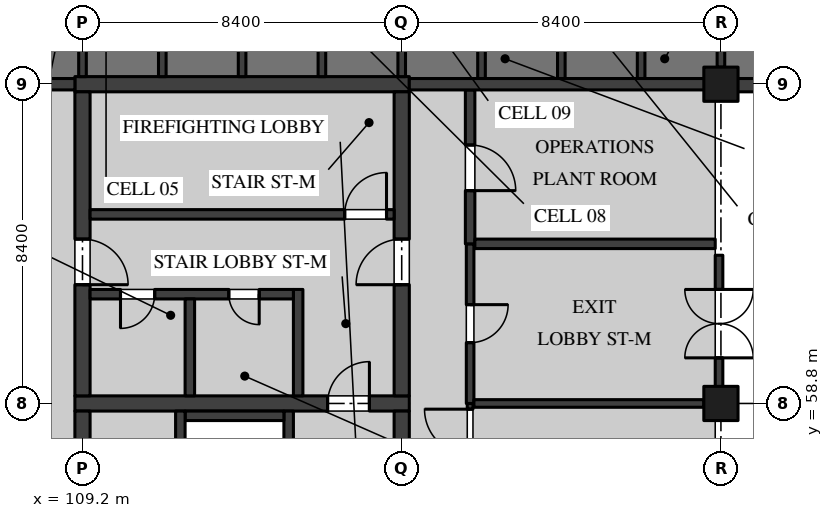
"""IFC4 building model, lengths in metres.
Left out: names, types, materials, properties, quantities, classifications, styles, units other than length and angle.
Written with IfcOpenShell. Run it as: python <this file> out.ifc"""

import sys

from ifc_helpers import new_model, si_unit, direction, frame, frame_2d, origin, origin_2d, place, context, subcontext, project, spatial, rectangle, extrude, element, fill, save


model = new_model("IFC4")
c1 = context("Model", 3, precision=1e-05, world=origin(), true_north=direction((0.0, 1.0)))
c2 = subcontext(c1, "Body", "Model", "MODEL_VIEW")
j1 = project(units=[si_unit("LENGTHUNIT", "METRE"), si_unit("PLANEANGLEUNIT", "RADIAN")], contexts=[c1])
p1 = place(None, origin())
s1 = spatial("IfcSite", under=j1, at=p1, CompositionType="ELEMENT")
p2 = place(p1, origin())
s2 = spatial("IfcBuilding", under=s1, at=p2, CompositionType="ELEMENT")
p3 = place(p2, origin())
s3 = spatial("IfcBuildingStorey", under=s2, at=p3, CompositionType="ELEMENT", Elevation=0.0)
for number, where, z_axis, x_axis in (
    (1, (126.0, 58.8, 0.0), (0.0, 0.0, 1.0), (1.0, 0.0, 0.0)),
    (2, (126.0, 67.2, 0.0), (0.0, 0.0, 1.0), (1.0, 0.0, 0.0)),
):
    element("IfcColumn", number, at=place(p3, frame(where, z_axis=z_axis, x_axis=x_axis)), inside=s3, PredefinedType="COLUMN", context=c2, shape_type="SweptSolid", body=[
        extrude(rectangle(XDim=0.9, YDim=0.9, at=origin_2d()), origin(), (0.0, 0.0, 1.0), 5.05),
    ])
p4 = place(p3, frame((109.0, 58.8, 0.0), z_axis=(0.0, 0.0, 1.0), x_axis=(1.0, 0.0, 0.0)))
e3 = element("IfcWall", 3, at=p4, inside=s3, PredefinedType="SHEAR", context=c2, shape_type="SweptSolid", body=[
    extrude(rectangle(XDim=8.8, YDim=0.4, at=frame_2d((4.4, 0.0))), origin(), (0.0, 0.0, 1.0), 5.05),
])
p5 = place(p4, frame((6.65, 0.0, 0.0)))
e4 = element("IfcOpeningElement", 4, at=p5, cuts=e3, PredefinedType="OPENING", context=c2, shape_type="SweptSolid", body=[
    extrude(rectangle(XDim=1.1, YDim=2.1, at=frame_2d((0.55, 1.05))), frame((0.0, 0.21, 0.0), z_axis=(0.0, -1.0, 0.0), x_axis=(1.0, 0.0, 0.0)), (0.0, 0.0, 1.0), 0.42),
])
p6 = place(p3, frame((109.2, 50.6, 0.0), z_axis=(0.0, 0.0, 1.0), x_axis=(0.0, 1.0, 0.0)))
e5 = element("IfcWall", 5, at=p6, inside=s3, PredefinedType="SHEAR", context=c2, shape_type="SweptSolid", body=[
    extrude(rectangle(XDim=8.0, YDim=0.4, at=frame_2d((4.0, 0.0))), origin(), (0.0, 0.0, 1.0), 5.05),
])
p7 = place(p6, frame((3.25, 0.0, 0.0)))
e6 = element("IfcOpeningElement", 6, at=p7, cuts=e5, PredefinedType="OPENING", context=c2, shape_type="SweptSolid", body=[
    extrude(rectangle(XDim=1.2, YDim=2.1, at=frame_2d((0.6, 1.05))), frame((0.0, 0.21, 0.0), z_axis=(0.0, -1.0, 0.0), x_axis=(1.0, 0.0, 0.0)), (0.0, 0.0, 1.0), 0.42),
])
p8 = place(p3, frame((117.6, 50.6, 0.0), z_axis=(0.0, 0.0, 1.0), x_axis=(0.0, 1.0, 0.0)))
e7 = element("IfcWall", 7, at=p8, inside=s3, PredefinedType="SHEAR", context=c2, shape_type="SweptSolid", body=[
    extrude(rectangle(XDim=8.0, YDim=0.4, at=frame_2d((4.0, 0.0))), origin(), (0.0, 0.0, 1.0), 5.05),
])
p9 = place(p8, frame((3.25, 0.0, 0.0)))
e8 = element("IfcOpeningElement", 8, at=p9, cuts=e7, PredefinedType="OPENING", context=c2, shape_type="SweptSolid", body=[
    extrude(rectangle(XDim=1.2, YDim=2.1, at=frame_2d((0.6, 1.05))), frame((0.0, 0.21, 0.0), z_axis=(0.0, -1.0, 0.0), x_axis=(1.0, 0.0, 0.0)), (0.0, 0.0, 1.0), 0.42),
])
p10 = place(p8, frame((6.0, 0.0, 0.0)))
e9 = element("IfcOpeningElement", 9, at=p10, cuts=e7, PredefinedType="OPENING", context=c2, shape_type="SweptSolid", body=[
    extrude(rectangle(XDim=1.2, YDim=2.1, at=frame_2d((0.6, 1.05))), frame((0.0, 0.21, 0.0), z_axis=(0.0, -1.0, 0.0), x_axis=(1.0, 0.0, 0.0)), (0.0, 0.0, 1.0), 0.42),
])
p11 = place(p3, frame((109.0, 67.2, 0.0), z_axis=(0.0, 0.0, 1.0), x_axis=(1.0, 0.0, 0.0)))
e10 = element("IfcWall", 10, at=p11, inside=s3, PredefinedType="SHEAR", context=c2, shape_type="SweptSolid", body=[
    extrude(rectangle(XDim=8.8, YDim=0.4, at=frame_2d((4.4, 0.0))), origin(), (0.0, 0.0, 1.0), 5.05),
])
p12 = place(p3, frame((109.2, 59.0, 0.0), z_axis=(0.0, 0.0, 1.0), x_axis=(0.0, 1.0, 0.0)))
e11 = element("IfcWall", 11, at=p12, inside=s3, PredefinedType="SHEAR", context=c2, shape_type="SweptSolid", body=[
    extrude(rectangle(XDim=8.0, YDim=0.4, at=frame_2d((4.0, 0.0))), origin(), (0.0, 0.0, 1.0), 5.05),
])
p13 = place(p12, frame((2.925, 0.0, 0.0)))
e12 = element("IfcOpeningElement", 12, at=p13, cuts=e11, PredefinedType="OPENING", context=c2, shape_type="SweptSolid", body=[
    extrude(rectangle(XDim=1.2, YDim=2.1, at=frame_2d((0.6, 1.05))), frame((0.0, 0.21, 0.0), z_axis=(0.0, -1.0, 0.0), x_axis=(1.0, 0.0, 0.0)), (0.0, 0.0, 1.0), 0.42),
])
p14 = place(p3, frame((117.6, 59.0, 0.0), z_axis=(0.0, 0.0, 1.0), x_axis=(0.0, 1.0, 0.0)))
e13 = element("IfcWall", 13, at=p14, inside=s3, PredefinedType="SHEAR", context=c2, shape_type="SweptSolid", body=[
    extrude(rectangle(XDim=8.0, YDim=0.4, at=frame_2d((4.0, 0.0))), origin(), (0.0, 0.0, 1.0), 5.05),
])
p15 = place(p14, frame((2.925, 0.0, 0.0)))
e14 = element("IfcOpeningElement", 14, at=p15, cuts=e13, PredefinedType="OPENING", context=c2, shape_type="SweptSolid", body=[
    extrude(rectangle(XDim=1.2, YDim=2.1, at=frame_2d((0.6, 1.05))), frame((0.0, 0.21, 0.0), z_axis=(0.0, -1.0, 0.0), x_axis=(1.0, 0.0, 0.0)), (0.0, 0.0, 1.0), 0.42),
])
p16 = place(p3, frame((117.4, 63.775, 0.0), z_axis=(0.0, 0.0, 1.0), x_axis=(-1.0, 0.0, 0.0)))
e15 = element("IfcWall", 15, at=p16, inside=s3, PredefinedType="SOLIDWALL", context=c2, shape_type="SweptSolid", body=[
    extrude(rectangle(XDim=8.0, YDim=0.25, at=frame_2d((4.0, 0.0))), origin(), (0.0, 0.0, 1.0), 5.05),
])
p17 = place(p16, frame((0.2, 0.0, 0.0)))
e16 = element("IfcOpeningElement", 16, at=p17, cuts=e15, PredefinedType="OPENING", context=c2, shape_type="SweptSolid", body=[
    extrude(rectangle(XDim=1.1, YDim=2.1, at=frame_2d((0.55, 1.05))), frame((0.0, 0.135, 0.0), z_axis=(0.0, -1.0, 0.0), x_axis=(1.0, 0.0, 0.0)), (0.0, 0.0, 1.0), 0.27),
])
p18 = place(p3, frame((114.875, 61.8, 0.0), z_axis=(0.0, 0.0, 1.0), x_axis=(0.0, -1.0, 0.0)))
e17 = element("IfcWall", 17, at=p18, inside=s3, PredefinedType="SOLIDWALL", context=c2, shape_type="SweptSolid", body=[
    extrude(rectangle(XDim=2.8, YDim=0.25, at=frame_2d((1.4, 0.0))), origin(), (0.0, 0.0, 1.0), 5.05),
])
p19 = place(p3, frame((114.75, 61.675, 0.0), z_axis=(0.0, 0.0, 1.0), x_axis=(-1.0, 0.0, 0.0)))
e18 = element("IfcWall", 18, at=p19, inside=s3, PredefinedType="SOLIDWALL", context=c2, shape_type="SweptSolid", body=[
    extrude(rectangle(XDim=5.35, YDim=0.25, at=frame_2d((2.675, 0.0))), origin(), (0.0, 0.0, 1.0), 5.05),
])
p20 = place(p19, frame((3.65, 0.0, 0.0)))
e19 = element("IfcOpeningElement", 19, at=p20, cuts=e18, PredefinedType="OPENING", context=c2, shape_type="SweptSolid", body=[
    extrude(rectangle(XDim=0.9, YDim=2.1, at=frame_2d((0.45, 1.05))), frame((0.0, 0.135, 0.0), z_axis=(0.0, -1.0, 0.0), x_axis=(1.0, 0.0, 0.0)), (0.0, 0.0, 1.0), 0.27),
])
p21 = place(p19, frame((0.9, 0.0, 0.0)))
e20 = element("IfcOpeningElement", 20, at=p21, cuts=e18, PredefinedType="OPENING", context=c2, shape_type="SweptSolid", body=[
    extrude(rectangle(XDim=0.8, YDim=2.1, at=frame_2d((0.4, 1.05))), frame((0.0, 0.135, 0.0), z_axis=(0.0, -1.0, 0.0), x_axis=(1.0, 0.0, 0.0)), (0.0, 0.0, 1.0), 0.27),
])
p22 = place(p3, frame((112.025, 61.55, 0.0), z_axis=(0.0, 0.0, 1.0), x_axis=(0.0, -1.0, 0.0)))
e21 = element("IfcWall", 21, at=p22, inside=s3, PredefinedType="SOLIDWALL", context=c2, shape_type="SweptSolid", body=[
    extrude(rectangle(XDim=2.55, YDim=0.25, at=frame_2d((1.275, 0.0))), origin(), (0.0, 0.0, 1.0), 5.05),
])
p23 = place(p3, frame((114.625, 55.5, 0.0), z_axis=(0.0, 0.0, 1.0), x_axis=(0.0, 1.0, 0.0)))
e22 = element("IfcWall", 22, at=p23, inside=s3, PredefinedType="SOLIDWALL", context=c2, shape_type="SweptSolid", body=[
    extrude(rectangle(XDim=3.1, YDim=0.25, at=frame_2d((1.55, 0.0))), origin(), (0.0, 0.0, 1.0), 5.05),
])
p24 = place(p23, frame((1.0, 0.0, 0.0)))
e23 = element("IfcOpeningElement", 23, at=p24, cuts=e22, PredefinedType="OPENING", context=c2, shape_type="SweptSolid", body=[
    extrude(rectangle(XDim=1.1, YDim=2.1, at=frame_2d((0.55, 1.05))), frame((0.0, 0.135, 0.0), z_axis=(0.0, -1.0, 0.0), x_axis=(1.0, 0.0, 0.0)), (0.0, 0.0, 1.0), 0.27),
])
p25 = place(p3, frame((111.9, 58.475, 0.0), z_axis=(0.0, 0.0, 1.0), x_axis=(1.0, 0.0, 0.0)))
e24 = element("IfcWall", 24, at=p25, inside=s3, PredefinedType="SOLIDWALL", context=c2, shape_type="SweptSolid", body=[
    extrude(rectangle(XDim=2.6, YDim=0.25, at=frame_2d((1.3, 0.0))), origin(), (0.0, 0.0, 1.0), 5.05),
])
p26 = place(p3, frame((111.775, 55.5, 0.0), z_axis=(0.0, 0.0, 1.0), x_axis=(0.0, 1.0, 0.0)))
e25 = element("IfcWall", 25, at=p26, inside=s3, PredefinedType="SOLIDWALL", context=c2, shape_type="SweptSolid", body=[
    extrude(rectangle(XDim=3.1, YDim=0.25, at=frame_2d((1.55, 0.0))), origin(), (0.0, 0.0, 1.0), 5.05),
])
p27 = place(p3, frame((119.4, 46.2, 0.0), z_axis=(0.0, 0.0, 1.0), x_axis=(0.0, 1.0, 0.0)))
e26 = element("IfcWall", 26, at=p27, inside=s3, PredefinedType="PARTITIONING", context=c2, shape_type="SweptSolid", body=[
    extrude(rectangle(XDim=12.6, YDim=0.15, at=frame_2d((6.3, 0.0))), origin(), (0.0, 0.0, 1.0), 5.05),
])
p28 = place(p27, frame((5.1, 0.0, 0.0)))
e27 = element("IfcOpeningElement", 27, at=p28, cuts=e26, PredefinedType="OPENING", context=c2, shape_type="SweptSolid", body=[
    extrude(rectangle(XDim=2.4, YDim=2.7, at=frame_2d((1.2, 1.35))), frame((0.0, 0.085, 0.0), z_axis=(0.0, -1.0, 0.0), x_axis=(1.0, 0.0, 0.0)), (0.0, 0.0, 1.0), 0.17),
])
p29 = place(p27, frame((10.05, 0.0, 0.0)))
e28 = element("IfcOpeningElement", 28, at=p29, cuts=e26, PredefinedType="OPENING", context=c2, shape_type="SweptSolid", body=[
    extrude(rectangle(XDim=2.4, YDim=2.7, at=frame_2d((1.2, 1.35))), frame((0.0, 0.085, 0.0), z_axis=(0.0, -1.0, 0.0), x_axis=(1.0, 0.0, 0.0)), (0.0, 0.0, 1.0), 0.17),
])
p30 = place(p3, frame((119.4, 58.8, 0.0), z_axis=(0.0, 0.0, 1.0), x_axis=(0.0, 1.0, 0.0)))
e29 = element("IfcWall", 29, at=p30, inside=s3, PredefinedType="PARTITIONING", context=c2, shape_type="SweptSolid", body=[
    extrude(rectangle(XDim=4.2, YDim=0.2, at=frame_2d((2.1, 0.0))), origin(), (0.0, 0.0, 1.0), 5.05),
])
p31 = place(p30, frame((1.6, 0.0, 0.0)))
e30 = element("IfcOpeningElement", 30, at=p31, cuts=e29, PredefinedType="OPENING", context=c2, shape_type="SweptSolid", body=[
    extrude(rectangle(XDim=1.0, YDim=2.4, at=frame_2d((0.5, 1.2))), frame((0.0, 0.11, 0.0), z_axis=(0.0, -1.0, 0.0), x_axis=(1.0, 0.0, 0.0)), (0.0, 0.0, 1.0), 0.22),
])
p32 = place(p3, frame((119.4, 63.0, 0.0), z_axis=(0.0, 0.0, 1.0), x_axis=(0.0, 1.0, 0.0)))
e31 = element("IfcWall", 31, at=p32, inside=s3, PredefinedType="PARTITIONING", context=c2, shape_type="SweptSolid", body=[
    extrude(rectangle(XDim=4.05, YDim=0.25, at=frame_2d((2.025, 0.0))), origin(), (0.0, 0.0, 1.0), 5.05),
])
p33 = place(p32, frame((1.4, 0.0, 0.0)))
e32 = element("IfcOpeningElement", 32, at=p33, cuts=e31, PredefinedType="OPENING", context=c2, shape_type="SweptSolid", body=[
    extrude(rectangle(XDim=1.2, YDim=2.4, at=frame_2d((0.6, 1.2))), frame((0.0, 0.135, 0.0), z_axis=(0.0, -1.0, 0.0), x_axis=(1.0, 0.0, 0.0)), (0.0, 0.0, 1.0), 0.27),
])
p34 = place(p3, frame((119.5, 58.8, 0.0), z_axis=(0.0, 0.0, 1.0), x_axis=(1.0, 0.0, 0.0)))
e33 = element("IfcWall", 33, at=p34, inside=s3, PredefinedType="PARTITIONING", context=c2, shape_type="SweptSolid", body=[
    extrude(rectangle(XDim=6.05, YDim=0.2, at=frame_2d((3.025, 0.0))), origin(), (0.0, 0.0, 1.0), 5.05),
])
p35 = place(p3, frame((119.525, 63.0, 0.0), z_axis=(0.0, 0.0, 1.0), x_axis=(1.0, 0.0, 0.0)))
e34 = element("IfcWall", 34, at=p35, inside=s3, PredefinedType="PARTITIONING", context=c2, shape_type="SweptSolid", body=[
    extrude(rectangle(XDim=6.325, YDim=0.25, at=frame_2d((3.163, 0.0))), origin(), (0.0, 0.0, 1.0), 5.05),
])
for number, where, z_axis, x_axis in (
    (35, (123.9, 67.35, 0.0), (0.0, 0.0, 1.0), (0.0, 1.0, 0.0)),
    (36, (121.8, 67.35, 0.0), (0.0, 0.0, 1.0), (0.0, 1.0, 0.0)),
):
    element("IfcWall", number, at=place(p3, frame(where, z_axis=z_axis, x_axis=x_axis)), inside=s3, PredefinedType="PARTITIONING", context=c2, shape_type="SweptSolid", body=[
        extrude(rectangle(XDim=3.05, YDim=0.2, at=frame_2d((1.525, 0.0))), origin(), (0.0, 0.0, 1.0), 5.05),
    ])
p36 = place(p3, frame((126.0, 67.65, 0.0), z_axis=(0.0, 0.0, 1.0), x_axis=(0.0, 1.0, 0.0)))
e37 = element("IfcWall", 37, at=p36, inside=s3, PredefinedType="PARTITIONING", context=c2, shape_type="SweptSolid", body=[
    extrude(rectangle(XDim=2.75, YDim=0.2, at=frame_2d((1.375, 0.0))), origin(), (0.0, 0.0, 1.0), 5.05),
])
for number, where, z_axis, x_axis in (
    (38, (109.2, 67.4, 0.0), (0.0, 0.0, 1.0), (0.0, 1.0, 0.0)),
    (39, (111.3, 67.4, 0.0), (0.0, 0.0, 1.0), (0.0, 1.0, 0.0)),
    (40, (113.4, 67.4, 0.0), (0.0, 0.0, 1.0), (0.0, 1.0, 0.0)),
    (41, (115.5, 67.4, 0.0), (0.0, 0.0, 1.0), (0.0, 1.0, 0.0)),
    (42, (117.6, 67.4, 0.0), (0.0, 0.0, 1.0), (0.0, 1.0, 0.0)),
):
    element("IfcWall", number, at=place(p3, frame(where, z_axis=z_axis, x_axis=x_axis)), inside=s3, PredefinedType="PARTITIONING", context=c2, shape_type="SweptSolid", body=[
        extrude(rectangle(XDim=3.0, YDim=0.2, at=frame_2d((1.5, 0.0))), origin(), (0.0, 0.0, 1.0), 5.05),
    ])
p37 = place(p3, frame((119.7, 67.35, 0.0), z_axis=(0.0, 0.0, 1.0), x_axis=(0.0, 1.0, 0.0)))
e43 = element("IfcWall", 43, at=p37, inside=s3, PredefinedType="PARTITIONING", context=c2, shape_type="SweptSolid", body=[
    extrude(rectangle(XDim=3.05, YDim=0.2, at=frame_2d((1.525, 0.0))), origin(), (0.0, 0.0, 1.0), 5.05),
])
p38 = place(p3, frame((125.95, 59.23, 0.0), z_axis=(0.0, 0.0, 1.0), x_axis=(0.0, 1.0, 0.0)))
e44 = element("IfcWall", 44, at=p38, inside=s3, PredefinedType="SOLIDWALL", context=c2, shape_type="SweptSolid", body=[
    extrude(rectangle(XDim=3.47, YDim=0.2, at=frame_2d((1.735, 0.0))), origin(), (0.0, 0.0, 1.0), 5.05),
])
p39 = place(p38, frame((0.77, 0.0, 0.0)))
e45 = element("IfcOpeningElement", 45, at=p39, cuts=e44, PredefinedType="OPENING", context=c2, shape_type="SweptSolid", body=[
    extrude(rectangle(XDim=1.8, YDim=2.4, at=frame_2d((0.9, 1.2))), frame((0.0, 0.11, 0.0), z_axis=(0.0, -1.0, 0.0), x_axis=(1.0, 0.0, 0.0)), (0.0, 0.0, 1.0), 0.22),
])
p40 = place(p3, frame((126.43, 67.175, 0.0), z_axis=(0.0, 0.0, 1.0), x_axis=(1.0, 0.0, 0.0)))
e46 = element("IfcWall", 46, at=p40, inside=s3, PredefinedType="SOLIDWALL", context=c2, shape_type="SweptSolid", body=[
    extrude(rectangle(XDim=7.59, YDim=0.35, at=frame_2d((3.795, 0.0))), origin(), (0.0, 0.0, 1.0), 5.05),
])
for number, where, z_axis, x_axis in (
    (47, (125.57, 67.2, 0.0), (0.0, 0.0, 1.0), (-1.0, 0.0, 0.0)),
    (48, (109.0, 67.2, 0.0), (0.0, 0.0, 1.0), (-1.0, 0.0, 0.0)),
):
    element("IfcWall", number, at=place(p3, frame(where, z_axis=z_axis, x_axis=x_axis)), inside=s3, PredefinedType="SOLIDWALL", context=c2, shape_type="SweptSolid", body=[
        extrude(rectangle(XDim=7.77, YDim=0.3, at=frame_2d((3.885, 0.0))), origin(), (0.0, 0.0, 1.0), 5.05),
    ])
p41 = place(p5, origin())
e49 = element("IfcDoor", 49, at=p41, inside=s3, OperationType="SINGLE_SWING_LEFT", PredefinedType="DOOR", context=c2, shape_type="SweptSolid", body=[
    extrude(rectangle(XDim=1.1, YDim=2.1, at=frame_2d((0.55, 1.05))), frame((0.0, 0.035, 0.0), z_axis=(0.0, -1.0, 0.0), x_axis=(1.0, 0.0, 0.0)), (0.0, 0.0, 1.0), 0.07),
])
fill(e4, e49)
p42 = place(p20, origin())
e50 = element("IfcDoor", 50, at=p42, inside=s3, OperationType="SINGLE_SWING_LEFT", PredefinedType="DOOR", context=c2, shape_type="SweptSolid", body=[
    extrude(rectangle(XDim=0.9, YDim=2.1, at=frame_2d((0.45, 1.05))), frame((0.0, 0.035, 0.0), z_axis=(0.0, -1.0, 0.0), x_axis=(1.0, 0.0, 0.0)), (0.0, 0.0, 1.0), 0.07),
])
fill(e19, e50)
p43 = place(p13, frame((1.2, 0.0, 0.0), z_axis=(0.0, 0.0, 1.0), x_axis=(-1.0, 0.0, 0.0)))
e51 = element("IfcDoor", 51, at=p43, inside=s3, OperationType="SINGLE_SWING_LEFT", PredefinedType="DOOR", context=c2, shape_type="SweptSolid", body=[
    extrude(rectangle(XDim=1.2, YDim=2.1, at=frame_2d((0.6, 1.05))), frame((0.0, 0.035, 0.0), z_axis=(0.0, -1.0, 0.0), x_axis=(1.0, 0.0, 0.0)), (0.0, 0.0, 1.0), 0.07),
])
fill(e12, e51)
p44 = place(p15, origin())
e52 = element("IfcDoor", 52, at=p44, inside=s3, OperationType="SINGLE_SWING_RIGHT", PredefinedType="DOOR", context=c2, shape_type="SweptSolid", body=[
    extrude(rectangle(XDim=1.2, YDim=2.1, at=frame_2d((0.6, 1.05))), frame((0.0, 0.035, 0.0), z_axis=(0.0, -1.0, 0.0), x_axis=(1.0, 0.0, 0.0)), (0.0, 0.0, 1.0), 0.07),
])
fill(e14, e52)
p45 = place(p21, origin())
e53 = element("IfcDoor", 53, at=p45, inside=s3, OperationType="SINGLE_SWING_RIGHT", PredefinedType="DOOR", context=c2, shape_type="SweptSolid", body=[
    extrude(rectangle(XDim=0.8, YDim=2.1, at=frame_2d((0.4, 1.05))), frame((0.0, 0.035, 0.0), z_axis=(0.0, -1.0, 0.0), x_axis=(1.0, 0.0, 0.0)), (0.0, 0.0, 1.0), 0.07),
])
fill(e20, e53)
p46 = place(p17, frame((1.1, 0.0, 0.0), z_axis=(0.0, 0.0, 1.0), x_axis=(-1.0, 0.0, 0.0)))
e54 = element("IfcDoor", 54, at=p46, inside=s3, OperationType="SINGLE_SWING_LEFT", PredefinedType="DOOR", context=c2, shape_type="SweptSolid", body=[
    extrude(rectangle(XDim=1.1, YDim=2.1, at=frame_2d((0.55, 1.05))), frame((0.0, 0.035, 0.0), z_axis=(0.0, -1.0, 0.0), x_axis=(1.0, 0.0, 0.0)), (0.0, 0.0, 1.0), 0.07),
])
fill(e16, e54)
p47 = place(p29, origin())
e55 = element("IfcDoor", 55, at=p47, inside=s3, OperationType="DOUBLE_DOOR_SINGLE_SWING", PredefinedType="DOOR", context=c2, shape_type="SweptSolid", body=[
    extrude(rectangle(XDim=2.4, YDim=2.7, at=frame_2d((1.2, 1.35))), frame((0.0, 0.025, 0.0), z_axis=(0.0, -1.0, 0.0), x_axis=(1.0, 0.0, 0.0)), (0.0, 0.0, 1.0), 0.05),
])
fill(e28, e55)
p48 = place(p31, frame((1.0, 0.0, 0.0), z_axis=(0.0, 0.0, 1.0), x_axis=(-1.0, 0.0, 0.0)))
e56 = element("IfcDoor", 56, at=p48, inside=s3, OperationType="SINGLE_SWING_RIGHT", PredefinedType="DOOR", context=c2, shape_type="SweptSolid", body=[
    extrude(rectangle(XDim=1.0, YDim=2.4, at=frame_2d((0.5, 1.2))), frame((0.0, 0.03, 0.0), z_axis=(0.0, -1.0, 0.0), x_axis=(1.0, 0.0, 0.0)), (0.0, 0.0, 1.0), 0.06),
])
fill(e30, e56)
p49 = place(p33, frame((1.2, 0.0, 0.0), z_axis=(0.0, 0.0, 1.0), x_axis=(-1.0, 0.0, 0.0)))
e57 = element("IfcDoor", 57, at=p49, inside=s3, OperationType="SINGLE_SWING_LEFT", PredefinedType="DOOR", context=c2, shape_type="SweptSolid", body=[
    extrude(rectangle(XDim=1.2, YDim=2.4, at=frame_2d((0.6, 1.2))), frame((0.0, 0.05, 0.0), z_axis=(0.0, -1.0, 0.0), x_axis=(1.0, 0.0, 0.0)), (0.0, 0.0, 1.0), 0.1),
])
fill(e32, e57)
p50 = place(p39, frame((1.8, 0.0, 0.0), z_axis=(0.0, 0.0, 1.0), x_axis=(-1.0, 0.0, 0.0)))
e58 = element("IfcDoor", 58, at=p50, inside=s3, OperationType="DOUBLE_DOOR_DOUBLE_SWING", PredefinedType="DOOR", context=c2, shape_type="SweptSolid", body=[
    extrude(rectangle(XDim=1.8, YDim=2.4, at=frame_2d((0.9, 1.2))), frame((0.0, 0.025, 0.0), z_axis=(0.0, -1.0, 0.0), x_axis=(1.0, 0.0, 0.0)), (0.0, 0.0, 1.0), 0.05),
])
fill(e45, e58)
save(model, sys.argv[1])
